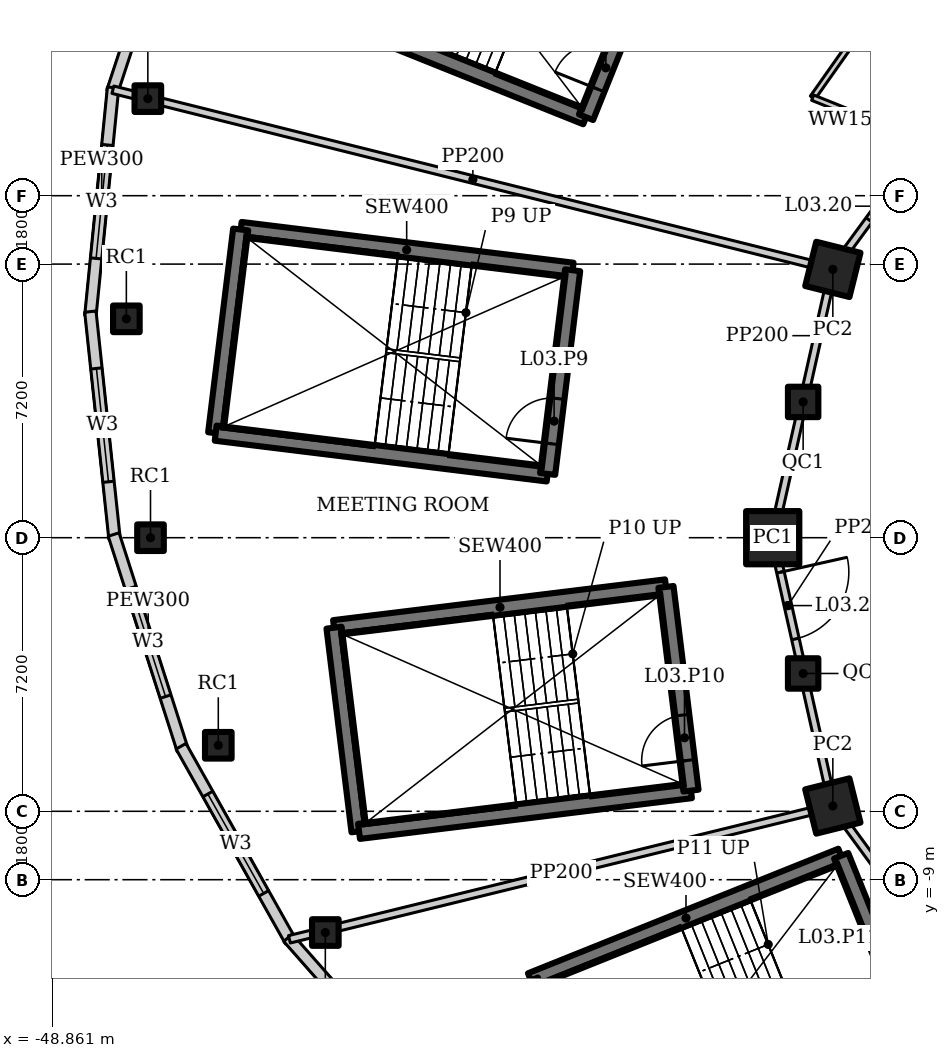
"""IFC4 building model, lengths in metres.
Left out: names, types, materials, properties, quantities, classifications, styles, units other than length and angle.
Written with IfcOpenShell. Run it as: python <this file> out.ifc"""

import sys

from ifc_helpers import new_model, si_unit, direction, frame, frame_2d, origin, origin_2d, place, context, subcontext, project, spatial, rectangle, hollow_rectangle, extrude, element, fill, save


model = new_model("IFC4")
c1 = context("Model", 3, precision=1e-05, world=origin(), true_north=direction((0.0, 1.0)))
c2 = subcontext(c1, "Body", "Model", "MODEL_VIEW")
j1 = project(units=[si_unit("LENGTHUNIT", "METRE"), si_unit("PLANEANGLEUNIT", "RADIAN")], contexts=[c1])
p1 = place(None, origin())
s1 = spatial("IfcSite", under=j1, at=p1, CompositionType="ELEMENT")
p2 = place(p1, origin())
s2 = spatial("IfcBuilding", under=s1, at=p2, CompositionType="ELEMENT")
p3 = place(p2, frame((0.0, 0.0, 22.0)))
s3 = spatial("IfcBuildingStorey", under=s2, at=p3, CompositionType="ELEMENT", Elevation=22.0)
p4 = place(p3, frame((-28.318, 7.06, 0.0), z_axis=(0.0, 0.0, 1.0), x_axis=(0.2419218956, 0.970295726276, 0.0)))
e1 = element("IfcColumn", 1, at=p4, inside=s3, PredefinedType="COLUMN", context=c2, shape_type="SweptSolid", body=[
    extrude(hollow_rectangle(XDim=1.2, YDim=1.2, WallThickness=0.1, at=origin_2d()), origin(), (0.0, 0.0, 1.0), 5.0),
])
p5 = place(p3, frame((-29.9, 0.0, 0.0), z_axis=(0.0, 0.0, 1.0), x_axis=(1.0, 0.0, 0.0)))
e2 = element("IfcColumn", 2, at=p5, inside=s3, PredefinedType="COLUMN", context=c2, shape_type="SweptSolid", body=[
    extrude(hollow_rectangle(XDim=1.4, YDim=1.4, WallThickness=0.1, at=origin_2d()), origin(), (0.0, 0.0, 1.0), 5.0),
])
p6 = place(p3, frame((-28.318, -7.06, 0.0), z_axis=(0.0, 0.0, 1.0), x_axis=(0.970295726276, 0.2419218956, 0.0)))
e3 = element("IfcColumn", 3, at=p6, inside=s3, PredefinedType="COLUMN", context=c2, shape_type="SweptSolid", body=[
    extrude(hollow_rectangle(XDim=1.2, YDim=1.2, WallThickness=0.1, at=origin_2d()), origin(), (0.0, 0.0, 1.0), 5.0),
])
for number, where, z_axis, x_axis in (
    (4, (-29.099, 3.573, 0.0), (0.0, 0.0, 1.0), (1.0, 0.0, 0.0)),
    (5, (-29.099, -3.573, 0.0), (0.0, 0.0, 1.0), (1.0, 0.0, 0.0)),
):
    element("IfcColumn", number, at=place(p3, frame(where, z_axis=z_axis, x_axis=x_axis)), inside=s3, PredefinedType="COLUMN", context=c2, shape_type="SweptSolid", body=[
        extrude(hollow_rectangle(XDim=0.8, YDim=0.8, WallThickness=0.05, at=origin_2d()), origin(), (0.0, 0.0, 1.0), 5.0),
    ])
for number, where, z_axis, x_axis in (
    (6, (-46.908, 5.76, 0.0), (0.0, 0.0, 1.0), (1.0, 0.0, 0.0)),
    (7, (-44.489, -5.462, 0.0), (0.0, 0.0, 1.0), (1.0, 0.0, 0.0)),
    (8, (-46.343, 11.554, 0.0), (0.0, 0.0, 1.0), (1.0, 0.0, 0.0)),
    (9, (-46.272, 0.0, 0.0), (0.0, 0.0, 1.0), (1.0, 0.0, 0.0)),
    (10, (-41.672, -10.39, 0.0), (0.0, 0.0, 1.0), (1.0, 0.0, 0.0)),
):
    element("IfcColumn", number, at=place(p3, frame(where, z_axis=z_axis, x_axis=x_axis)), inside=s3, PredefinedType="COLUMN", context=c2, shape_type="SweptSolid", body=[
        extrude(hollow_rectangle(XDim=0.7, YDim=0.7, WallThickness=0.04, at=origin_2d()), origin(), (0.0, 0.0, 1.0), 5.0),
    ])
p7 = place(p3, frame((-45.158, 18.182, 0.0), z_axis=(0.0, 0.0, 1.0), x_axis=(-0.31263149373, -0.94987449125, 0.0)))
e11 = element("IfcWall", 11, at=p7, inside=s3, PredefinedType="SOLIDWALL", context=c2, shape_type="SweptSolid", body=[
    extrude(rectangle(XDim=6.786, YDim=0.3, at=frame_2d((3.393, 0.0))), origin(), (0.0, 0.0, 1.0), 4.8),
])
p8 = place(p7, frame((1.893, 0.0, 0.9)))
e12 = element("IfcOpeningElement", 12, at=p8, cuts=e11, PredefinedType="OPENING", context=c2, shape_type="SweptSolid", body=[
    extrude(rectangle(XDim=3.0, YDim=2.0, at=frame_2d((1.5, 1.0))), frame((0.0, 0.16, 0.0), z_axis=(0.0, -1.0, 0.0), x_axis=(1.0, 0.0, 0.0)), (0.0, 0.0, 1.0), 0.32),
])
p9 = place(p3, frame((-47.257, 11.845, 0.0), z_axis=(0.0, 0.0, 1.0), x_axis=(-0.099051198898, -0.9950823383, 0.0)))
e13 = element("IfcWall", 13, at=p9, inside=s3, PredefinedType="SOLIDWALL", context=c2, shape_type="SweptSolid", body=[
    extrude(rectangle(XDim=6.036, YDim=0.3, at=frame_2d((3.018, 0.0))), origin(), (0.0, 0.0, 1.0), 4.8),
])
p10 = place(p9, frame((1.518, 0.0, 0.9)))
e14 = element("IfcOpeningElement", 14, at=p10, cuts=e13, PredefinedType="OPENING", context=c2, shape_type="SweptSolid", body=[
    extrude(rectangle(XDim=3.0, YDim=2.0, at=frame_2d((1.5, 1.0))), frame((0.0, 0.16, 0.0), z_axis=(0.0, -1.0, 0.0), x_axis=(1.0, 0.0, 0.0)), (0.0, 0.0, 1.0), 0.32),
])
p11 = place(p3, frame((-47.855, 5.949, 0.0), z_axis=(0.0, 0.0, 1.0), x_axis=(0.105835648981, -0.99438363593, 0.0)))
e15 = element("IfcWall", 15, at=p11, inside=s3, PredefinedType="SOLIDWALL", context=c2, shape_type="SweptSolid", body=[
    extrude(rectangle(XDim=6.007, YDim=0.3, at=frame_2d((3.003, 0.0))), origin(), (0.0, 0.0, 1.0), 4.8),
])
p12 = place(p11, frame((1.503, 0.0, 0.9)))
e16 = element("IfcOpeningElement", 16, at=p12, cuts=e15, PredefinedType="OPENING", context=c2, shape_type="SweptSolid", body=[
    extrude(rectangle(XDim=3.0, YDim=2.0, at=frame_2d((1.5, 1.0))), frame((0.0, 0.16, 0.0), z_axis=(0.0, -1.0, 0.0), x_axis=(1.0, 0.0, 0.0)), (0.0, 0.0, 1.0), 0.32),
])
p13 = place(p3, frame((-47.242, 0.084, 0.0), z_axis=(0.0, 0.0, 1.0), x_axis=(0.304991367091, -0.95235511549, 0.0)))
e17 = element("IfcWall", 17, at=p13, inside=s3, PredefinedType="SOLIDWALL", context=c2, shape_type="SweptSolid", body=[
    extrude(rectangle(XDim=5.956, YDim=0.3, at=frame_2d((2.978, 0.0))), origin(), (0.0, 0.0, 1.0), 4.8),
])
p14 = place(p13, frame((1.478, 0.0, 0.9)))
e18 = element("IfcOpeningElement", 18, at=p14, cuts=e17, PredefinedType="OPENING", context=c2, shape_type="SweptSolid", body=[
    extrude(rectangle(XDim=3.0, YDim=2.0, at=frame_2d((1.5, 1.0))), frame((0.0, 0.16, 0.0), z_axis=(0.0, -1.0, 0.0), x_axis=(1.0, 0.0, 0.0)), (0.0, 0.0, 1.0), 0.32),
])
p15 = place(p3, frame((-45.469, -5.488, 0.0), z_axis=(0.0, 0.0, 1.0), x_axis=(0.489563544979, -0.871967622924, 0.0)))
e19 = element("IfcWall", 19, at=p15, inside=s3, PredefinedType="SOLIDWALL", context=c2, shape_type="SweptSolid", body=[
    extrude(rectangle(XDim=5.883, YDim=0.3, at=frame_2d((2.941, 0.0))), origin(), (0.0, 0.0, 1.0), 4.8),
])
p16 = place(p15, frame((1.441, 0.0, 0.9)))
e20 = element("IfcOpeningElement", 20, at=p16, cuts=e19, PredefinedType="OPENING", context=c2, shape_type="SweptSolid", body=[
    extrude(rectangle(XDim=3.0, YDim=2.0, at=frame_2d((1.5, 1.0))), frame((0.0, 0.16, 0.0), z_axis=(0.0, -1.0, 0.0), x_axis=(1.0, 0.0, 0.0)), (0.0, 0.0, 1.0), 0.32),
])
p17 = place(p3, frame((-42.654, -10.527, 0.0), z_axis=(0.0, 0.0, 1.0), x_axis=(0.661196672464, -0.75021261008, 0.0)))
e21 = element("IfcWall", 21, at=p17, inside=s3, PredefinedType="SOLIDWALL", context=c2, shape_type="SweptSolid", body=[
    extrude(rectangle(XDim=6.481, YDim=0.3, at=frame_2d((3.24, 0.0))), origin(), (0.0, 0.0, 1.0), 4.8),
])
p18 = place(p17, frame((1.74, 0.0, 0.9)))
e22 = element("IfcOpeningElement", 22, at=p18, cuts=e21, PredefinedType="OPENING", context=c2, shape_type="SweptSolid", body=[
    extrude(rectangle(XDim=3.0, YDim=2.0, at=frame_2d((1.5, 1.0))), frame((0.0, 0.16, 0.0), z_axis=(0.0, -1.0, 0.0), x_axis=(1.0, 0.0, 0.0)), (0.0, 0.0, 1.0), 0.32),
])
p19 = place(p3, frame((-25.878, 10.388, 0.0), z_axis=(0.0, 0.0, 1.0), x_axis=(-0.591255937291, -0.806483984105, 0.0)))
e23 = element("IfcWall", 23, at=p19, inside=s3, PredefinedType="SOLIDWALL", context=c2, shape_type="SweptSolid", body=[
    extrude(rectangle(XDim=4.127, YDim=0.2, at=frame_2d((2.063, 0.0))), origin(), (0.0, 0.0, 1.0), 4.396),
])
p20 = place(p19, frame((1.613, 0.0, 0.0)))
e24 = element("IfcOpeningElement", 24, at=p20, cuts=e23, PredefinedType="OPENING", context=c2, shape_type="SweptSolid", body=[
    extrude(rectangle(XDim=0.9, YDim=2.1, at=frame_2d((0.45, 1.05))), frame((0.0, 0.11, 0.0), z_axis=(0.0, -1.0, 0.0), x_axis=(1.0, 0.0, 0.0)), (0.0, 0.0, 1.0), 0.22),
])
p21 = place(p3, frame((-28.318, 7.06, 0.0), z_axis=(0.0, 0.0, 1.0), x_axis=(-0.218673326171, -0.97579812278, 0.0)))
e25 = element("IfcWall", 25, at=p21, inside=s3, PredefinedType="SOLIDWALL", context=c2, shape_type="SweptSolid", body=[
    extrude(rectangle(XDim=3.574, YDim=0.2, at=frame_2d((1.787, 0.0))), origin(), (0.0, 0.0, 1.0), 4.394),
])
p22 = place(p3, frame((-29.099, 3.573, 0.0), z_axis=(0.0, 0.0, 1.0), x_axis=(-0.218631550323, -0.975807483679, 0.0)))
e26 = element("IfcWall", 26, at=p22, inside=s3, PredefinedType="SOLIDWALL", context=c2, shape_type="SweptSolid", body=[
    extrude(rectangle(XDim=3.662, YDim=0.2, at=frame_2d((1.831, 0.0))), origin(), (0.0, 0.0, 1.0), 4.35),
])
p23 = place(p3, frame((-29.9, 0.0, 0.0), z_axis=(0.0, 0.0, 1.0), x_axis=(0.218631550323, -0.975807483679, 0.0)))
e27 = element("IfcWall", 27, at=p23, inside=s3, PredefinedType="SOLIDWALL", context=c2, shape_type="SweptSolid", body=[
    extrude(rectangle(XDim=3.662, YDim=0.2, at=frame_2d((1.831, 0.0))), origin(), (0.0, 0.0, 1.0), 4.272),
])
p24 = place(p23, frame((0.931, 0.0, 0.0)))
e28 = element("IfcOpeningElement", 28, at=p24, cuts=e27, PredefinedType="OPENING", context=c2, shape_type="SweptSolid", body=[
    extrude(rectangle(XDim=1.8, YDim=2.4, at=frame_2d((0.9, 1.2))), frame((0.0, 0.11, 0.0), z_axis=(0.0, -1.0, 0.0), x_axis=(1.0, 0.0, 0.0)), (0.0, 0.0, 1.0), 0.22),
])
p25 = place(p3, frame((-29.099, -3.573, 0.0), z_axis=(0.0, 0.0, 1.0), x_axis=(0.218673326171, -0.97579812278, 0.0)))
e29 = element("IfcWall", 29, at=p25, inside=s3, PredefinedType="SOLIDWALL", context=c2, shape_type="SweptSolid", body=[
    extrude(rectangle(XDim=3.574, YDim=0.2, at=frame_2d((1.787, 0.0))), origin(), (0.0, 0.0, 1.0), 4.396),
])
p26 = place(p3, frame((-28.318, -7.06, 0.0), z_axis=(0.0, 0.0, 1.0), x_axis=(0.591255937291, -0.806483984105, 0.0)))
e30 = element("IfcWall", 30, at=p26, inside=s3, PredefinedType="SOLIDWALL", context=c2, shape_type="SweptSolid", body=[
    extrude(rectangle(XDim=4.127, YDim=0.2, at=frame_2d((2.063, 0.0))), origin(), (0.0, 0.0, 1.0), 3.3),
])
p27 = place(p3, frame((-28.318, 7.06, 0.0), z_axis=(0.0, 0.0, 1.0), x_axis=(-0.970227758662, 0.242194335859, 0.0)))
e31 = element("IfcWall", 31, at=p27, inside=s3, PredefinedType="SOLIDWALL", context=c2, shape_type="SweptSolid", body=[
    extrude(rectangle(XDim=19.526, YDim=0.2, at=frame_2d((9.763, 0.0))), origin(), (0.0, 0.0, 1.0), 3.3),
])
p28 = place(p3, frame((-28.318, -7.06, 0.0), z_axis=(0.0, 0.0, 1.0), x_axis=(-0.971190644534, -0.238303864783, 0.0)))
e32 = element("IfcWall", 32, at=p28, inside=s3, PredefinedType="SOLIDWALL", context=c2, shape_type="SweptSolid", body=[
    extrude(rectangle(XDim=14.723, YDim=0.2, at=frame_2d((7.361, 0.0))), origin(), (0.0, 0.0, 1.0), 3.3),
])
p29 = place(p3, frame((-26.385, 15.073, 0.0), z_axis=(0.0, 0.0, 1.0), x_axis=(-0.576153892924, -0.81734123331, 0.0)))
e33 = element("IfcWall", 33, at=p29, inside=s3, PredefinedType="SOLIDWALL", context=c2, shape_type="SweptSolid", body=[
    extrude(rectangle(XDim=4.275, YDim=0.15, at=frame_2d((2.137, 0.0))), origin(), (0.0, 0.0, 1.0), 4.8),
])
p30 = place(p3, frame((-25.878, 10.388, 0.0), z_axis=(0.0, 0.0, 1.0), x_axis=(-0.928160641083, 0.372179827966, 0.0)))
e34 = element("IfcWall", 34, at=p30, inside=s3, PredefinedType="SOLIDWALL", context=c2, shape_type="SweptSolid", body=[
    extrude(rectangle(XDim=3.2, YDim=0.15, at=frame_2d((1.6, 0.0))), origin(), (0.0, 0.0, 1.0), 4.8),
])
p31 = place(p3, frame((-42.978, 14.344, 0.0), z_axis=(0.0, 0.0, 1.0), x_axis=(0.92801678004, -0.372538395288, 0.0)))
e35 = element("IfcWall", 35, at=p31, inside=s3, PredefinedType="SHEAR", context=c2, shape_type="SweptSolid", body=[
    extrude(rectangle(XDim=8.8, YDim=0.4, at=frame_2d((4.4, 0.0))), origin(), (0.0, 0.0, 1.0), 5.0),
])
p32 = place(p3, frame((-34.812, 11.065, 0.0), z_axis=(0.0, 0.0, 1.0), x_axis=(0.372544066459, 0.928014503414, 0.0)))
e36 = element("IfcWall", 36, at=p32, inside=s3, PredefinedType="SHEAR", context=c2, shape_type="SweptSolid", body=[
    extrude(rectangle(XDim=5.4, YDim=0.4, at=frame_2d((2.7, 0.0))), origin(), (0.0, 0.0, 1.0), 5.0),
])
p33 = place(p32, frame((0.8, 0.0, 0.0)))
e37 = element("IfcOpeningElement", 37, at=p33, cuts=e36, PredefinedType="OPENING", context=c2, shape_type="SweptSolid", body=[
    extrude(rectangle(XDim=1.2, YDim=2.1, at=frame_2d((0.6, 1.05))), frame((0.0, 0.21, 0.0), z_axis=(0.0, -1.0, 0.0), x_axis=(1.0, 0.0, 0.0)), (0.0, 0.0, 1.0), 0.42),
])
p34 = place(p3, frame((-35.165, 7.038, 0.0), z_axis=(0.0, 0.0, 1.0), x_axis=(-0.992545280606, 0.121876437212, 0.0)))
e38 = element("IfcWall", 38, at=p34, inside=s3, PredefinedType="SHEAR", context=c2, shape_type="SweptSolid", body=[
    extrude(rectangle(XDim=8.8, YDim=0.4, at=frame_2d((4.4, 0.0))), origin(), (0.0, 0.0, 1.0), 5.0),
])
p35 = place(p3, frame((-43.899, 8.11, 0.0), z_axis=(0.0, 0.0, 1.0), x_axis=(-0.12184754212, -0.99254882826, 0.0)))
e39 = element("IfcWall", 39, at=p35, inside=s3, PredefinedType="SHEAR", context=c2, shape_type="SweptSolid", body=[
    extrude(rectangle(XDim=5.4, YDim=0.4, at=frame_2d((2.7, 0.0))), origin(), (0.0, 0.0, 1.0), 5.0),
])
p36 = place(p3, frame((-44.557, 2.751, 0.0), z_axis=(0.0, 0.0, 1.0), x_axis=(0.992545280606, -0.121876437212, 0.0)))
e40 = element("IfcWall", 40, at=p36, inside=s3, PredefinedType="SHEAR", context=c2, shape_type="SweptSolid", body=[
    extrude(rectangle(XDim=8.8, YDim=0.4, at=frame_2d((4.4, 0.0))), origin(), (0.0, 0.0, 1.0), 5.0),
])
p37 = place(p3, frame((-35.823, 1.678, 0.0), z_axis=(0.0, 0.0, 1.0), x_axis=(0.12184754212, 0.99254882826, 0.0)))
e41 = element("IfcWall", 41, at=p37, inside=s3, PredefinedType="SHEAR", context=c2, shape_type="SweptSolid", body=[
    extrude(rectangle(XDim=5.4, YDim=0.4, at=frame_2d((2.7, 0.0))), origin(), (0.0, 0.0, 1.0), 5.0),
])
p38 = place(p37, frame((0.8, 0.0, 0.0)))
e42 = element("IfcOpeningElement", 42, at=p38, cuts=e41, PredefinedType="OPENING", context=c2, shape_type="SweptSolid", body=[
    extrude(rectangle(XDim=1.2, YDim=2.1, at=frame_2d((0.6, 1.05))), frame((0.0, 0.21, 0.0), z_axis=(0.0, -1.0, 0.0), x_axis=(1.0, 0.0, 0.0)), (0.0, 0.0, 1.0), 0.42),
])
p39 = place(p3, frame((-32.708, -1.296, 0.0), z_axis=(0.0, 0.0, 1.0), x_axis=(-0.992545692684, -0.121873081252, 0.0)))
e43 = element("IfcWall", 43, at=p39, inside=s3, PredefinedType="SHEAR", context=c2, shape_type="SweptSolid", body=[
    extrude(rectangle(XDim=8.8, YDim=0.4, at=frame_2d((4.4, 0.0))), origin(), (0.0, 0.0, 1.0), 5.0),
])
p40 = place(p3, frame((-41.443, -2.368, 0.0), z_axis=(0.0, 0.0, 1.0), x_axis=(0.121892082937, -0.992543359314, 0.0)))
e44 = element("IfcWall", 44, at=p40, inside=s3, PredefinedType="SHEAR", context=c2, shape_type="SweptSolid", body=[
    extrude(rectangle(XDim=5.4, YDim=0.4, at=frame_2d((2.7, 0.0))), origin(), (0.0, 0.0, 1.0), 5.0),
])
p41 = place(p3, frame((-40.785, -7.728, 0.0), z_axis=(0.0, 0.0, 1.0), x_axis=(0.992545280606, 0.121876437212, 0.0)))
e45 = element("IfcWall", 45, at=p41, inside=s3, PredefinedType="SHEAR", context=c2, shape_type="SweptSolid", body=[
    extrude(rectangle(XDim=8.8, YDim=0.4, at=frame_2d((4.4, 0.0))), origin(), (0.0, 0.0, 1.0), 5.0),
])
p42 = place(p3, frame((-32.051, -6.656, 0.0), z_axis=(0.0, 0.0, 1.0), x_axis=(-0.12184754212, 0.99254882826, 0.0)))
e46 = element("IfcWall", 46, at=p42, inside=s3, PredefinedType="SHEAR", context=c2, shape_type="SweptSolid", body=[
    extrude(rectangle(XDim=5.4, YDim=0.4, at=frame_2d((2.7, 0.0))), origin(), (0.0, 0.0, 1.0), 5.0),
])
p43 = place(p42, frame((0.8, 0.0, 0.0)))
e47 = element("IfcOpeningElement", 47, at=p43, cuts=e46, PredefinedType="OPENING", context=c2, shape_type="SweptSolid", body=[
    extrude(rectangle(XDim=1.2, YDim=2.1, at=frame_2d((0.6, 1.05))), frame((0.0, 0.21, 0.0), z_axis=(0.0, -1.0, 0.0), x_axis=(1.0, 0.0, 0.0)), (0.0, 0.0, 1.0), 0.42),
])
p44 = place(p3, frame((-28.099, -8.371, 0.0), z_axis=(0.0, 0.0, 1.0), x_axis=(-0.92801678004, -0.372538395288, 0.0)))
e48 = element("IfcWall", 48, at=p44, inside=s3, PredefinedType="SHEAR", context=c2, shape_type="SweptSolid", body=[
    extrude(rectangle(XDim=8.8, YDim=0.4, at=frame_2d((4.4, 0.0))), origin(), (0.0, 0.0, 1.0), 5.0),
])
p45 = place(p3, frame((-26.087, -13.382, 0.0), z_axis=(0.0, 0.0, 1.0), x_axis=(-0.372544066459, 0.928014503414, 0.0)))
e49 = element("IfcWall", 49, at=p45, inside=s3, PredefinedType="SHEAR", context=c2, shape_type="SweptSolid", body=[
    extrude(rectangle(XDim=5.4, YDim=0.4, at=frame_2d((2.7, 0.0))), origin(), (0.0, 0.0, 1.0), 5.0),
])
p46 = place(p45, frame((0.8, 0.0, 0.0)))
e50 = element("IfcOpeningElement", 50, at=p46, cuts=e49, PredefinedType="OPENING", context=c2, shape_type="SweptSolid", body=[
    extrude(rectangle(XDim=1.2, YDim=2.1, at=frame_2d((0.6, 1.05))), frame((0.0, 0.21, 0.0), z_axis=(0.0, -1.0, 0.0), x_axis=(1.0, 0.0, 0.0)), (0.0, 0.0, 1.0), 0.42),
])
p47 = place(p10, origin())
e51 = element("IfcWindow", 51, at=p47, inside=s3, PartitioningType="SINGLE_PANEL", PredefinedType="WINDOW", context=c2, shape_type="SweptSolid", body=[
    extrude(rectangle(XDim=3.0, YDim=2.0, at=frame_2d((1.5, 1.0))), frame((0.0, 0.03, 0.0), z_axis=(0.0, -1.0, 0.0), x_axis=(1.0, 0.0, 0.0)), (0.0, 0.0, 1.0), 0.06),
])
fill(e14, e51)
p48 = place(p12, origin())
e52 = element("IfcWindow", 52, at=p48, inside=s3, PartitioningType="SINGLE_PANEL", PredefinedType="WINDOW", context=c2, shape_type="SweptSolid", body=[
    extrude(rectangle(XDim=3.0, YDim=2.0, at=frame_2d((1.5, 1.0))), frame((0.0, 0.03, 0.0), z_axis=(0.0, -1.0, 0.0), x_axis=(1.0, 0.0, 0.0)), (0.0, 0.0, 1.0), 0.06),
])
fill(e16, e52)
p49 = place(p14, origin())
e53 = element("IfcWindow", 53, at=p49, inside=s3, PartitioningType="SINGLE_PANEL", PredefinedType="WINDOW", context=c2, shape_type="SweptSolid", body=[
    extrude(rectangle(XDim=3.0, YDim=2.0, at=frame_2d((1.5, 1.0))), frame((0.0, 0.03, 0.0), z_axis=(0.0, -1.0, 0.0), x_axis=(1.0, 0.0, 0.0)), (0.0, 0.0, 1.0), 0.06),
])
fill(e18, e53)
p50 = place(p16, origin())
e54 = element("IfcWindow", 54, at=p50, inside=s3, PartitioningType="SINGLE_PANEL", PredefinedType="WINDOW", context=c2, shape_type="SweptSolid", body=[
    extrude(rectangle(XDim=3.0, YDim=2.0, at=frame_2d((1.5, 1.0))), frame((0.0, 0.03, 0.0), z_axis=(0.0, -1.0, 0.0), x_axis=(1.0, 0.0, 0.0)), (0.0, 0.0, 1.0), 0.06),
])
fill(e20, e54)
p51 = place(p20, origin())
e55 = element("IfcDoor", 55, at=p51, inside=s3, OperationType="SINGLE_SWING_LEFT", PredefinedType="DOOR", context=c2, shape_type="SweptSolid", body=[
    extrude(rectangle(XDim=0.9, YDim=2.1, at=frame_2d((0.45, 1.05))), frame((0.0, 0.025, 0.0), z_axis=(0.0, -1.0, 0.0), x_axis=(1.0, 0.0, 0.0)), (0.0, 0.0, 1.0), 0.05),
])
fill(e24, e55)
p52 = place(p24, origin())
e56 = element("IfcDoor", 56, at=p52, inside=s3, OperationType="DOUBLE_DOOR_DOUBLE_SWING", PredefinedType="DOOR", context=c2, shape_type="SweptSolid", body=[
    extrude(rectangle(XDim=1.8, YDim=2.4, at=frame_2d((0.9, 1.2))), frame((0.0, 0.025, 0.0), z_axis=(0.0, -1.0, 0.0), x_axis=(1.0, 0.0, 0.0)), (0.0, 0.0, 1.0), 0.05),
])
fill(e28, e56)
p53 = place(p33, origin())
e57 = element("IfcDoor", 57, at=p53, inside=s3, OperationType="SINGLE_SWING_RIGHT", PredefinedType="DOOR", context=c2, shape_type="SweptSolid", body=[
    extrude(rectangle(XDim=1.2, YDim=2.1, at=frame_2d((0.6, 1.05))), frame((0.0, 0.025, 0.0), z_axis=(0.0, -1.0, 0.0), x_axis=(1.0, 0.0, 0.0)), (0.0, 0.0, 1.0), 0.05),
])
fill(e37, e57)
p54 = place(p38, origin())
e58 = element("IfcDoor", 58, at=p54, inside=s3, OperationType="SINGLE_SWING_RIGHT", PredefinedType="DOOR", context=c2, shape_type="SweptSolid", body=[
    extrude(rectangle(XDim=1.2, YDim=2.1, at=frame_2d((0.6, 1.05))), frame((0.0, 0.025, 0.0), z_axis=(0.0, -1.0, 0.0), x_axis=(1.0, 0.0, 0.0)), (0.0, 0.0, 1.0), 0.05),
])
fill(e42, e58)
p55 = place(p43, origin())
e59 = element("IfcDoor", 59, at=p55, inside=s3, OperationType="SINGLE_SWING_RIGHT", PredefinedType="DOOR", context=c2, shape_type="SweptSolid", body=[
    extrude(rectangle(XDim=1.2, YDim=2.1, at=frame_2d((0.6, 1.05))), frame((0.0, 0.025, 0.0), z_axis=(0.0, -1.0, 0.0), x_axis=(1.0, 0.0, 0.0)), (0.0, 0.0, 1.0), 0.05),
])
fill(e47, e59)
save(model, sys.argv[1])
